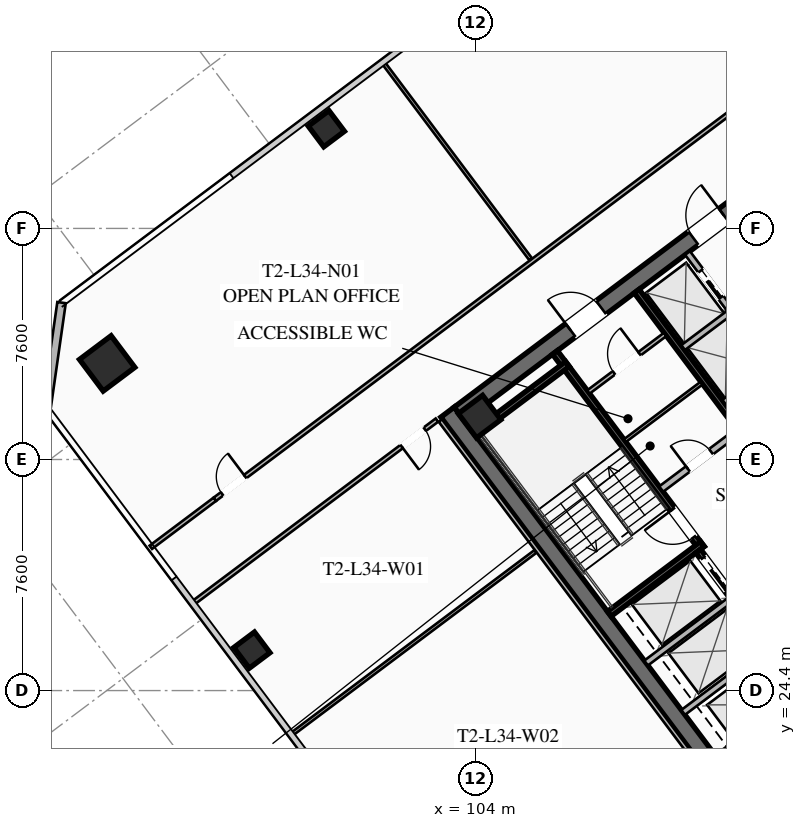
"""IFC4 building model, lengths in metres.
Left out: names, types, materials, properties, quantities, classifications, styles, units other than length and angle.
Written with IfcOpenShell. Run it as: python <this file> out.ifc"""

import sys

from ifc_helpers import new_model, si_unit, direction, frame, frame_2d, origin, origin_2d, place, context, subcontext, project, spatial, rectangle, hollow_rectangle, extrude, element, fill, save


model = new_model("IFC4")
c1 = context("Model", 3, precision=1e-05, world=origin(), true_north=direction((0.0, 1.0)))
c2 = subcontext(c1, "Body", "Model", "MODEL_VIEW")
j1 = project(units=[si_unit("LENGTHUNIT", "METRE"), si_unit("PLANEANGLEUNIT", "RADIAN")], contexts=[c1])
p1 = place(None, origin())
s1 = spatial("IfcSite", under=j1, at=p1, CompositionType="ELEMENT")
p2 = place(p1, origin())
s2 = spatial("IfcBuilding", under=s1, at=p2, CompositionType="ELEMENT")
p3 = place(p2, frame((0.0, 0.0, 128.6)))
s3 = spatial("IfcBuildingStorey", under=s2, at=p3, CompositionType="ELEMENT", Elevation=128.6)
p4 = place(p3, frame((112.436, 21.077, 0.0), z_axis=(0.0, 0.0, 1.0), x_axis=(-0.600005007985, 0.799996243986, 0.0)))
e1 = element("IfcWall", 1, at=p4, inside=s3, PredefinedType="SHEAR", context=c2, shape_type="SweptSolid", body=[
    extrude(rectangle(XDim=15.6, YDim=0.55, at=frame_2d((7.8, 0.0))), origin(), (0.0, 0.0, 1.0), 3.55),
])
p5 = place(p3, frame((103.461, 33.502, 0.0), z_axis=(0.0, 0.0, 1.0), x_axis=(0.799998054672, 0.600002593761, 0.0)))
e2 = element("IfcWall", 2, at=p5, inside=s3, PredefinedType="SHEAR", context=c2, shape_type="SweptSolid", body=[
    extrude(rectangle(XDim=15.06, YDim=0.55, at=frame_2d((7.53, 0.0))), origin(), (0.0, 0.0, 1.0), 3.55),
])
p6 = place(p5, frame((4.58, 0.0, 0.0)))
e3 = element("IfcOpeningElement", 3, at=p6, cuts=e2, PredefinedType="OPENING", context=c2, shape_type="SweptSolid", body=[
    extrude(rectangle(XDim=1.25, YDim=2.25, at=frame_2d((0.625, 1.125))), frame((0.0, 0.285, 0.0), z_axis=(0.0, -1.0, 0.0), x_axis=(1.0, 0.0, 0.0)), (0.0, 0.0, 1.0), 0.57),
])
p7 = place(p5, frame((9.63, 0.0, 0.0)))
e4 = element("IfcOpeningElement", 4, at=p7, cuts=e2, PredefinedType="OPENING", context=c2, shape_type="SweptSolid", body=[
    extrude(rectangle(XDim=1.25, YDim=2.25, at=frame_2d((0.625, 1.125))), frame((0.0, 0.285, 0.0), z_axis=(0.0, -1.0, 0.0), x_axis=(1.0, 0.0, 0.0)), (0.0, 0.0, 1.0), 0.57),
])
for number, where, z_axis, x_axis in (
    (5, (112.59, 22.13, 0.0), (0.0, 0.0, 1.0), (0.8, 0.6, 0.0)),
    (6, (104.13, 33.41, 0.0), (0.0, 0.0, 1.0), (0.8, 0.6, 0.0)),
):
    element("IfcColumn", number, at=place(p3, frame(where, z_axis=z_axis, x_axis=x_axis)), inside=s3, PredefinedType="COLUMN", context=c2, shape_type="SweptSolid", body=[
        extrude(hollow_rectangle(XDim=1.0, YDim=1.0, WallThickness=0.04, at=origin_2d()), origin(), (0.0, 0.0, 1.0), 3.37),
    ])
p8 = place(p3, frame((91.88, 35.16, 0.0), z_axis=(0.0, 0.0, 1.0), x_axis=(0.799999996291, 0.600000004945, 0.0)))
e7 = element("IfcColumn", 7, at=p8, inside=s3, PredefinedType="COLUMN", context=c2, shape_type="SweptSolid", body=[
    extrude(hollow_rectangle(XDim=1.3, YDim=1.3, WallThickness=0.05, at=origin_2d()), origin(), (0.0, 0.0, 1.0), 3.37),
])
for number, where, z_axis, x_axis in (
    (8, (99.09, 42.88, 0.0), (0.0, 0.0, 1.0), (0.8, 0.6, 0.0)),
    (9, (96.64, 25.73, 0.0), (0.0, 0.0, 1.0), (0.8, 0.6, 0.0)),
):
    element("IfcColumn", number, at=place(p3, frame(where, z_axis=z_axis, x_axis=x_axis)), inside=s3, PredefinedType="COLUMN", context=c2, shape_type="SweptSolid", body=[
        extrude(hollow_rectangle(XDim=0.85, YDim=0.85, WallThickness=0.035, at=origin_2d()), origin(), (0.0, 0.0, 1.0), 3.37),
    ])
p9 = place(p3, frame((89.88, 33.66, 0.0), z_axis=(0.0, 0.0, 1.0), x_axis=(0.141421356237, 0.989949493661, 0.0)))
e10 = element("IfcWall", 10, at=p9, inside=s3, PredefinedType="SOLIDWALL", context=c2, shape_type="SweptSolid", body=[
    extrude(rectangle(XDim=3.536, YDim=0.28, at=frame_2d((1.768, 0.0))), origin(), (0.0, 0.0, 1.0), 3.37),
])
p10 = place(p3, frame((111.44, 29.08, 0.0), z_axis=(0.0, 0.0, 1.0), x_axis=(-0.59999029481, 0.8000072788, 0.0)))
e11 = element("IfcWall", 11, at=p10, inside=s3, PredefinedType="SHEAR", context=c2, shape_type="SweptSolid", body=[
    extrude(rectangle(XDim=8.05, YDim=0.2, at=frame_2d((4.025, 0.0))), origin(), (0.0, 0.0, 1.0), 3.37),
])
p11 = place(p10, frame((0.45, 0.0, 0.0)))
e12 = element("IfcOpeningElement", 12, at=p11, cuts=e11, PredefinedType="OPENING", context=c2, shape_type="SweptSolid", body=[
    extrude(rectangle(XDim=1.15, YDim=2.2, at=frame_2d((0.575, 1.1))), frame((0.0, 0.11, 0.0), z_axis=(0.0, -1.0, 0.0), x_axis=(1.0, 0.0, 0.0)), (0.0, 0.0, 1.0), 0.22),
])
for number, where, z_axis, x_axis in (
    (13, (108.396, 26.922, 0.0), (0.0, 0.0, 1.0), (0.8, 0.6, 0.0)),
    (14, (103.956, 32.842, 0.0), (0.0, 0.0, 1.0), (0.8, 0.6, 0.0)),
):
    element("IfcWall", number, at=place(p3, frame(where, z_axis=z_axis, x_axis=x_axis)), inside=s3, PredefinedType="SHEAR", context=c2, shape_type="SweptSolid", body=[
        extrude(rectangle(XDim=3.83, YDim=0.2, at=frame_2d((1.915, 0.0))), origin(), (0.0, 0.0, 1.0), 3.37),
    ])
p12 = place(p3, frame((117.998, 25.936, 0.0), z_axis=(0.0, 0.0, 1.0), x_axis=(-0.600002693989, 0.799997979501, 0.0)))
e15 = element("IfcWall", 15, at=p12, inside=s3, PredefinedType="SHEAR", context=c2, shape_type="SweptSolid", body=[
    extrude(rectangle(XDim=14.5, YDim=0.2, at=frame_2d((7.25, 0.0))), origin(), (0.0, 0.0, 1.0), 3.37),
])
p13 = place(p3, frame((110.104, 31.028, 0.0), z_axis=(0.0, 0.0, 1.0), x_axis=(0.800018601094, 0.59997519774, 0.0)))
e16 = element("IfcWall", 16, at=p13, inside=s3, PredefinedType="SOLIDWALL", context=c2, shape_type="SweptSolid", body=[
    extrude(rectangle(XDim=3.15, YDim=0.22, at=frame_2d((1.575, 0.0))), origin(), (0.0, 0.0, 1.0), 2.723),
])
p14 = place(p13, frame((1.1, 0.0, 0.0)))
e17 = element("IfcOpeningElement", 17, at=p14, cuts=e16, PredefinedType="OPENING", context=c2, shape_type="SweptSolid", body=[
    extrude(rectangle(XDim=0.95, YDim=2.05, at=frame_2d((0.475, 1.025))), frame((0.0, 0.12, 0.0), z_axis=(0.0, -1.0, 0.0), x_axis=(1.0, 0.0, 0.0)), (0.0, 0.0, 1.0), 0.24),
])
p15 = place(p3, frame((115.19, 23.83, 0.0), z_axis=(0.0, 0.0, 1.0), x_axis=(-0.599993943644, 0.800004542231, 0.0)))
e18 = element("IfcWall", 18, at=p15, inside=s3, PredefinedType="SHEAR", context=c2, shape_type="SweptSolid", body=[
    extrude(rectangle(XDim=6.45, YDim=0.2, at=frame_2d((3.225, 0.0))), origin(), (0.0, 0.0, 1.0), 3.37),
])
p16 = place(p15, frame((4.875, 0.0, 0.0)))
e19 = element("IfcOpeningElement", 19, at=p16, cuts=e18, PredefinedType="OPENING", context=c2, shape_type="SweptSolid", body=[
    extrude(rectangle(XDim=1.3, YDim=2.25, at=frame_2d((0.65, 1.125))), frame((0.0, 0.11, 0.0), z_axis=(0.0, -1.0, 0.0), x_axis=(1.0, 0.0, 0.0)), (0.0, 0.0, 1.0), 0.22),
])
p17 = place(p15, frame((2.875, 0.0, 0.0)))
e20 = element("IfcOpeningElement", 20, at=p17, cuts=e18, PredefinedType="OPENING", context=c2, shape_type="SweptSolid", body=[
    extrude(rectangle(XDim=1.3, YDim=2.25, at=frame_2d((0.65, 1.125))), frame((0.0, 0.11, 0.0), z_axis=(0.0, -1.0, 0.0), x_axis=(1.0, 0.0, 0.0)), (0.0, 0.0, 1.0), 0.22),
])
p18 = place(p15, frame((0.675, 0.0, 0.0)))
e21 = element("IfcOpeningElement", 21, at=p18, cuts=e18, PredefinedType="OPENING", context=c2, shape_type="SweptSolid", body=[
    extrude(rectangle(XDim=1.3, YDim=2.25, at=frame_2d((0.65, 1.125))), frame((0.0, 0.11, 0.0), z_axis=(0.0, -1.0, 0.0), x_axis=(1.0, 0.0, 0.0)), (0.0, 0.0, 1.0), 0.22),
])
for number, where, z_axis, x_axis in (
    (22, (110.826, 23.682, 0.0), (0.0, 0.0, 1.0), (0.8, 0.6, 0.0)),
    (23, (109.608, 25.306, 0.0), (0.0, 0.0, 1.0), (0.8, 0.6, 0.0)),
):
    element("IfcWall", number, at=place(p3, frame(where, z_axis=z_axis, x_axis=x_axis)), inside=s3, PredefinedType="SOLIDWALL", context=c2, shape_type="SweptSolid", body=[
        extrude(rectangle(XDim=3.48, YDim=0.2, at=frame_2d((1.74, 0.0))), origin(), (0.0, 0.0, 1.0), 3.37),
    ])
p19 = place(p3, frame((107.71, 34.22, 0.0), z_axis=(0.0, 0.0, 1.0), x_axis=(0.799981399002, 0.60002480053, 0.0)))
e24 = element("IfcWall", 24, at=p19, inside=s3, PredefinedType="PARTITIONING", context=c2, shape_type="SweptSolid", body=[
    extrude(rectangle(XDim=3.15, YDim=0.135, at=frame_2d((1.575, 0.0))), origin(), (0.0, 0.0, 1.0), 2.723),
])
p20 = place(p19, frame((1.05, 0.0, 0.0)))
e25 = element("IfcOpeningElement", 25, at=p20, cuts=e24, PredefinedType="OPENING", context=c2, shape_type="SweptSolid", body=[
    extrude(rectangle(XDim=1.05, YDim=2.2, at=frame_2d((0.525, 1.1))), frame((0.0, 0.077, 0.0), z_axis=(0.0, -1.0, 0.0), x_axis=(1.0, 0.0, 0.0)), (0.0, 0.0, 1.0), 0.155),
])
p21 = place(p3, frame((108.91, 32.62, 0.0), z_axis=(0.0, 0.0, 1.0), x_axis=(0.800018601094, 0.59997519774, 0.0)))
e26 = element("IfcWall", 26, at=p21, inside=s3, PredefinedType="PARTITIONING", context=c2, shape_type="SweptSolid", body=[
    extrude(rectangle(XDim=3.15, YDim=0.11, at=frame_2d((1.575, 0.0))), origin(), (0.0, 0.0, 1.0), 2.723),
])
p22 = place(p3, frame((115.11, 33.27, 0.0), z_axis=(0.0, 0.0, 1.0), x_axis=(-0.600011322243, 0.799991508192, 0.0)))
e27 = element("IfcWall", 27, at=p22, inside=s3, PredefinedType="SOLIDWALL", context=c2, shape_type="SweptSolid", body=[
    extrude(rectangle(XDim=6.9, YDim=0.2, at=frame_2d((3.45, 0.0))), origin(), (0.0, 0.0, 1.0), 3.37),
])
p23 = place(p22, frame((0.575, 0.0, 0.0)))
e28 = element("IfcOpeningElement", 28, at=p23, cuts=e27, PredefinedType="OPENING", context=c2, shape_type="SweptSolid", body=[
    extrude(rectangle(XDim=1.1, YDim=2.2, at=frame_2d((0.55, 1.1))), frame((0.0, 0.11, 0.0), z_axis=(0.0, -1.0, 0.0), x_axis=(1.0, 0.0, 0.0)), (0.0, 0.0, 1.0), 0.22),
])
p24 = place(p22, frame((2.825, 0.0, 0.0)))
e29 = element("IfcOpeningElement", 29, at=p24, cuts=e27, PredefinedType="OPENING", context=c2, shape_type="SweptSolid", body=[
    extrude(rectangle(XDim=1.1, YDim=2.2, at=frame_2d((0.55, 1.1))), frame((0.0, 0.11, 0.0), z_axis=(0.0, -1.0, 0.0), x_axis=(1.0, 0.0, 0.0)), (0.0, 0.0, 1.0), 0.22),
])
p25 = place(p22, frame((5.075, 0.0, 0.0)))
e30 = element("IfcOpeningElement", 30, at=p25, cuts=e27, PredefinedType="OPENING", context=c2, shape_type="SweptSolid", body=[
    extrude(rectangle(XDim=1.1, YDim=2.2, at=frame_2d((0.55, 1.1))), frame((0.0, 0.11, 0.0), z_axis=(0.0, -1.0, 0.0), x_axis=(1.0, 0.0, 0.0)), (0.0, 0.0, 1.0), 0.22),
])
p26 = place(p3, frame((112.176, 33.882, 0.0), z_axis=(0.0, 0.0, 1.0), x_axis=(0.8, 0.6, 0.0)))
e31 = element("IfcWall", 31, at=p26, inside=s3, PredefinedType="SOLIDWALL", context=c2, shape_type="SweptSolid", body=[
    extrude(rectangle(XDim=1.88, YDim=0.2, at=frame_2d((0.94, 0.0))), origin(), (0.0, 0.0, 1.0), 3.37),
])
p27 = place(p3, frame((110.826, 35.682, 0.0), z_axis=(0.0, 0.0, 1.0), x_axis=(0.799984418148, 0.600020775241, 0.0)))
e32 = element("IfcWall", 32, at=p27, inside=s3, PredefinedType="SOLIDWALL", context=c2, shape_type="SweptSolid", body=[
    extrude(rectangle(XDim=1.88, YDim=0.2, at=frame_2d((0.94, 0.0))), origin(), (0.0, 0.0, 1.0), 3.37),
])
p28 = place(p3, frame((95.42, 30.69, 0.0), z_axis=(0.0, 0.0, 1.0), x_axis=(0.8, 0.6, 0.0)))
e33 = element("IfcWall", 33, at=p28, inside=s3, PredefinedType="PARTITIONING", context=c2, shape_type="SweptSolid", body=[
    extrude(rectangle(XDim=31.3, YDim=0.135, at=frame_2d((15.65, 0.0))), origin(), (0.0, 0.0, 1.0), 2.723),
])
p29 = place(p28, frame((0.3, 0.0, 0.0)))
e34 = element("IfcOpeningElement", 34, at=p29, cuts=e33, PredefinedType="OPENING", context=c2, shape_type="SweptSolid", body=[
    extrude(rectangle(XDim=0.95, YDim=2.05, at=frame_2d((0.475, 1.025))), frame((0.0, 0.077, 0.0), z_axis=(0.0, -1.0, 0.0), x_axis=(1.0, 0.0, 0.0)), (0.0, 0.0, 1.0), 0.155),
])
p30 = place(p28, frame((30.05, 0.0, 0.0)))
e35 = element("IfcOpeningElement", 35, at=p30, cuts=e33, PredefinedType="OPENING", context=c2, shape_type="SweptSolid", body=[
    extrude(rectangle(XDim=0.95, YDim=2.05, at=frame_2d((0.475, 1.025))), frame((0.0, 0.077, 0.0), z_axis=(0.0, -1.0, 0.0), x_axis=(1.0, 0.0, 0.0)), (0.0, 0.0, 1.0), 0.155),
])
p31 = place(p3, frame((93.316, 29.112, 0.0), z_axis=(0.0, 0.0, 1.0), x_axis=(0.80002227902, 0.599970293491, 0.0)))
e36 = element("IfcWall", 36, at=p31, inside=s3, PredefinedType="PARTITIONING", context=c2, shape_type="SweptSolid", body=[
    extrude(rectangle(XDim=2.63, YDim=0.135, at=frame_2d((1.315, 0.0))), origin(), (0.0, 0.0, 1.0), 2.723),
])
p32 = place(p3, frame((105.812, 38.584, 0.0), z_axis=(0.0, 0.0, 1.0), x_axis=(-0.60000964496, 0.799992766189, 0.0)))
e37 = element("IfcWall", 37, at=p32, inside=s3, PredefinedType="PARTITIONING", context=c2, shape_type="SweptSolid", body=[
    extrude(rectangle(XDim=8.1, YDim=0.11, at=frame_2d((4.05, 0.0))), origin(), (0.0, 0.0, 1.0), 2.723),
])
p33 = place(p3, frame((132.262, 33.734, 0.0), z_axis=(0.0, 0.0, 1.0), x_axis=(-0.800003744006, -0.59999500796, 0.0)))
e38 = element("IfcWall", 38, at=p33, inside=s3, PredefinedType="PARTITIONING", context=c2, shape_type="SweptSolid", body=[
    extrude(rectangle(XDim=31.3, YDim=0.135, at=frame_2d((15.65, 0.0))), origin(), (0.0, 0.0, 1.0), 2.723),
])
p34 = place(p33, frame((29.97, 0.0, 0.0)))
e39 = element("IfcOpeningElement", 39, at=p34, cuts=e38, PredefinedType="OPENING", context=c2, shape_type="SweptSolid", body=[
    extrude(rectangle(XDim=0.95, YDim=2.05, at=frame_2d((0.475, 1.025))), frame((0.0, 0.077, 0.0), z_axis=(0.0, -1.0, 0.0), x_axis=(1.0, 0.0, 0.0)), (0.0, 0.0, 1.0), 0.155),
])
p35 = place(p33, frame((15.43, 0.0, 0.0)))
e40 = element("IfcOpeningElement", 40, at=p35, cuts=e38, PredefinedType="OPENING", context=c2, shape_type="SweptSolid", body=[
    extrude(rectangle(XDim=0.95, YDim=2.05, at=frame_2d((0.475, 1.025))), frame((0.0, 0.077, 0.0), z_axis=(0.0, -1.0, 0.0), x_axis=(1.0, 0.0, 0.0)), (0.0, 0.0, 1.0), 0.155),
])
p36 = place(p33, frame((11.146, 0.0, 0.0)))
e41 = element("IfcOpeningElement", 41, at=p36, cuts=e38, PredefinedType="OPENING", context=c2, shape_type="SweptSolid", body=[
    extrude(rectangle(XDim=0.95, YDim=2.05, at=frame_2d((0.475, 1.025))), frame((0.0, 0.077, 0.0), z_axis=(0.0, -1.0, 0.0), x_axis=(1.0, 0.0, 0.0)), (0.0, 0.0, 1.0), 0.155),
])
p37 = place(p33, frame((0.38, 0.0, 0.0)))
e42 = element("IfcOpeningElement", 42, at=p37, cuts=e38, PredefinedType="OPENING", context=c2, shape_type="SweptSolid", body=[
    extrude(rectangle(XDim=0.95, YDim=2.05, at=frame_2d((0.475, 1.025))), frame((0.0, 0.077, 0.0), z_axis=(0.0, -1.0, 0.0), x_axis=(1.0, 0.0, 0.0)), (0.0, 0.0, 1.0), 0.155),
])
p38 = place(p3, frame((112.104, 20.928, 0.0), z_axis=(0.0, 0.0, 1.0), x_axis=(-0.599994940075, 0.800003794918, 0.0)))
e43 = element("IfcWall", 43, at=p38, inside=s3, PredefinedType="PARTITIONING", context=c2, shape_type="SweptSolid", body=[
    extrude(rectangle(XDim=15.44, YDim=0.135, at=frame_2d((7.72, 0.0))), origin(), (0.0, 0.0, 1.0), 2.723),
])
p39 = place(p3, frame((102.728, 33.296, 0.0), z_axis=(0.0, 0.0, 1.0), x_axis=(-0.800002918023, -0.599996109283, 0.0)))
e44 = element("IfcWall", 44, at=p39, inside=s3, PredefinedType="PARTITIONING", context=c2, shape_type="SweptSolid", body=[
    extrude(rectangle(XDim=10.04, YDim=0.135, at=frame_2d((5.02, 0.0))), origin(), (0.0, 0.0, 1.0), 2.723),
])
p40 = place(p39, frame((0.5, 0.0, 0.0)))
e45 = element("IfcOpeningElement", 45, at=p40, cuts=e44, PredefinedType="OPENING", context=c2, shape_type="SweptSolid", body=[
    extrude(rectangle(XDim=0.95, YDim=2.05, at=frame_2d((0.475, 1.025))), frame((0.0, 0.077, 0.0), z_axis=(0.0, -1.0, 0.0), x_axis=(1.0, 0.0, 0.0)), (0.0, 0.0, 1.0), 0.155),
])
p41 = place(p3, frame((97.936, 22.952, 0.0), z_axis=(0.0, 0.0, 1.0), x_axis=(0.799991245945, 0.600011671896, 0.0)))
e46 = element("IfcWall", 46, at=p41, inside=s3, PredefinedType="PARTITIONING", context=c2, shape_type="SweptSolid", body=[
    extrude(rectangle(XDim=10.04, YDim=0.11, at=frame_2d((5.02, 0.0))), origin(), (0.0, 0.0, 1.0), 2.723),
])
p42 = place(p6, origin())
e47 = element("IfcDoor", 47, at=p42, inside=s3, OperationType="SINGLE_SWING_LEFT", PredefinedType="DOOR", context=c2, shape_type="SweptSolid", body=[
    extrude(rectangle(XDim=1.25, YDim=2.25, at=frame_2d((0.625, 1.125))), frame((0.0, 0.025, 0.0), z_axis=(0.0, -1.0, 0.0), x_axis=(1.0, 0.0, 0.0)), (0.0, 0.0, 1.0), 0.05),
])
fill(e3, e47)
p43 = place(p7, origin())
e48 = element("IfcDoor", 48, at=p43, inside=s3, OperationType="SINGLE_SWING_RIGHT", PredefinedType="DOOR", context=c2, shape_type="SweptSolid", body=[
    extrude(rectangle(XDim=1.25, YDim=2.25, at=frame_2d((0.625, 1.125))), frame((0.0, 0.025, 0.0), z_axis=(0.0, -1.0, 0.0), x_axis=(1.0, 0.0, 0.0)), (0.0, 0.0, 1.0), 0.05),
])
fill(e4, e48)
p44 = place(p11, origin())
e49 = element("IfcDoor", 49, at=p44, inside=s3, OperationType="SINGLE_SWING_RIGHT", PredefinedType="DOOR", context=c2, shape_type="SweptSolid", body=[
    extrude(rectangle(XDim=1.15, YDim=2.2, at=frame_2d((0.575, 1.1))), frame((0.0, 0.025, 0.0), z_axis=(0.0, -1.0, 0.0), x_axis=(1.0, 0.0, 0.0)), (0.0, 0.0, 1.0), 0.05),
])
fill(e12, e49)
p45 = place(p20, origin())
e50 = element("IfcDoor", 50, at=p45, inside=s3, OperationType="SINGLE_SWING_RIGHT", PredefinedType="DOOR", context=c2, shape_type="SweptSolid", body=[
    extrude(rectangle(XDim=1.05, YDim=2.2, at=frame_2d((0.525, 1.1))), frame((0.0, 0.025, 0.0), z_axis=(0.0, -1.0, 0.0), x_axis=(1.0, 0.0, 0.0)), (0.0, 0.0, 1.0), 0.05),
])
fill(e25, e50)
p46 = place(p14, origin())
e51 = element("IfcDoor", 51, at=p46, inside=s3, OperationType="SINGLE_SWING_LEFT", PredefinedType="DOOR", context=c2, shape_type="SweptSolid", body=[
    extrude(rectangle(XDim=0.95, YDim=2.05, at=frame_2d((0.475, 1.025))), frame((0.0, 0.025, 0.0), z_axis=(0.0, -1.0, 0.0), x_axis=(1.0, 0.0, 0.0)), (0.0, 0.0, 1.0), 0.05),
])
fill(e17, e51)
p47 = place(p29, origin())
e52 = element("IfcDoor", 52, at=p47, inside=s3, OperationType="SINGLE_SWING_RIGHT", PredefinedType="DOOR", context=c2, shape_type="SweptSolid", body=[
    extrude(rectangle(XDim=0.95, YDim=2.05, at=frame_2d((0.475, 1.025))), frame((0.0, 0.025, 0.0), z_axis=(0.0, -1.0, 0.0), x_axis=(1.0, 0.0, 0.0)), (0.0, 0.0, 1.0), 0.05),
])
fill(e34, e52)
p48 = place(p40, origin())
e53 = element("IfcDoor", 53, at=p48, inside=s3, OperationType="SINGLE_SWING_RIGHT", PredefinedType="DOOR", context=c2, shape_type="SweptSolid", body=[
    extrude(rectangle(XDim=0.95, YDim=2.05, at=frame_2d((0.475, 1.025))), frame((0.0, 0.025, 0.0), z_axis=(0.0, -1.0, 0.0), x_axis=(1.0, 0.0, 0.0)), (0.0, 0.0, 1.0), 0.05),
])
fill(e45, e53)
p49 = place(p16, origin())
e54 = element("IfcDoor", 54, at=p49, inside=s3, OperationType="SLIDING_TO_LEFT", PredefinedType="DOOR", context=c2, shape_type="SweptSolid", body=[
    extrude(rectangle(XDim=1.3, YDim=2.25, at=frame_2d((0.65, 1.125))), frame((0.0, 0.025, 0.0), z_axis=(0.0, -1.0, 0.0), x_axis=(1.0, 0.0, 0.0)), (0.0, 0.0, 1.0), 0.05),
])
fill(e19, e54)
p50 = place(p25, origin())
e55 = element("IfcDoor", 55, at=p50, inside=s3, OperationType="SLIDING_TO_LEFT", PredefinedType="DOOR", context=c2, shape_type="SweptSolid", body=[
    extrude(rectangle(XDim=1.1, YDim=2.2, at=frame_2d((0.55, 1.1))), frame((0.0, 0.025, 0.0), z_axis=(0.0, -1.0, 0.0), x_axis=(1.0, 0.0, 0.0)), (0.0, 0.0, 1.0), 0.05),
])
fill(e30, e55)
save(model, sys.argv[1])
